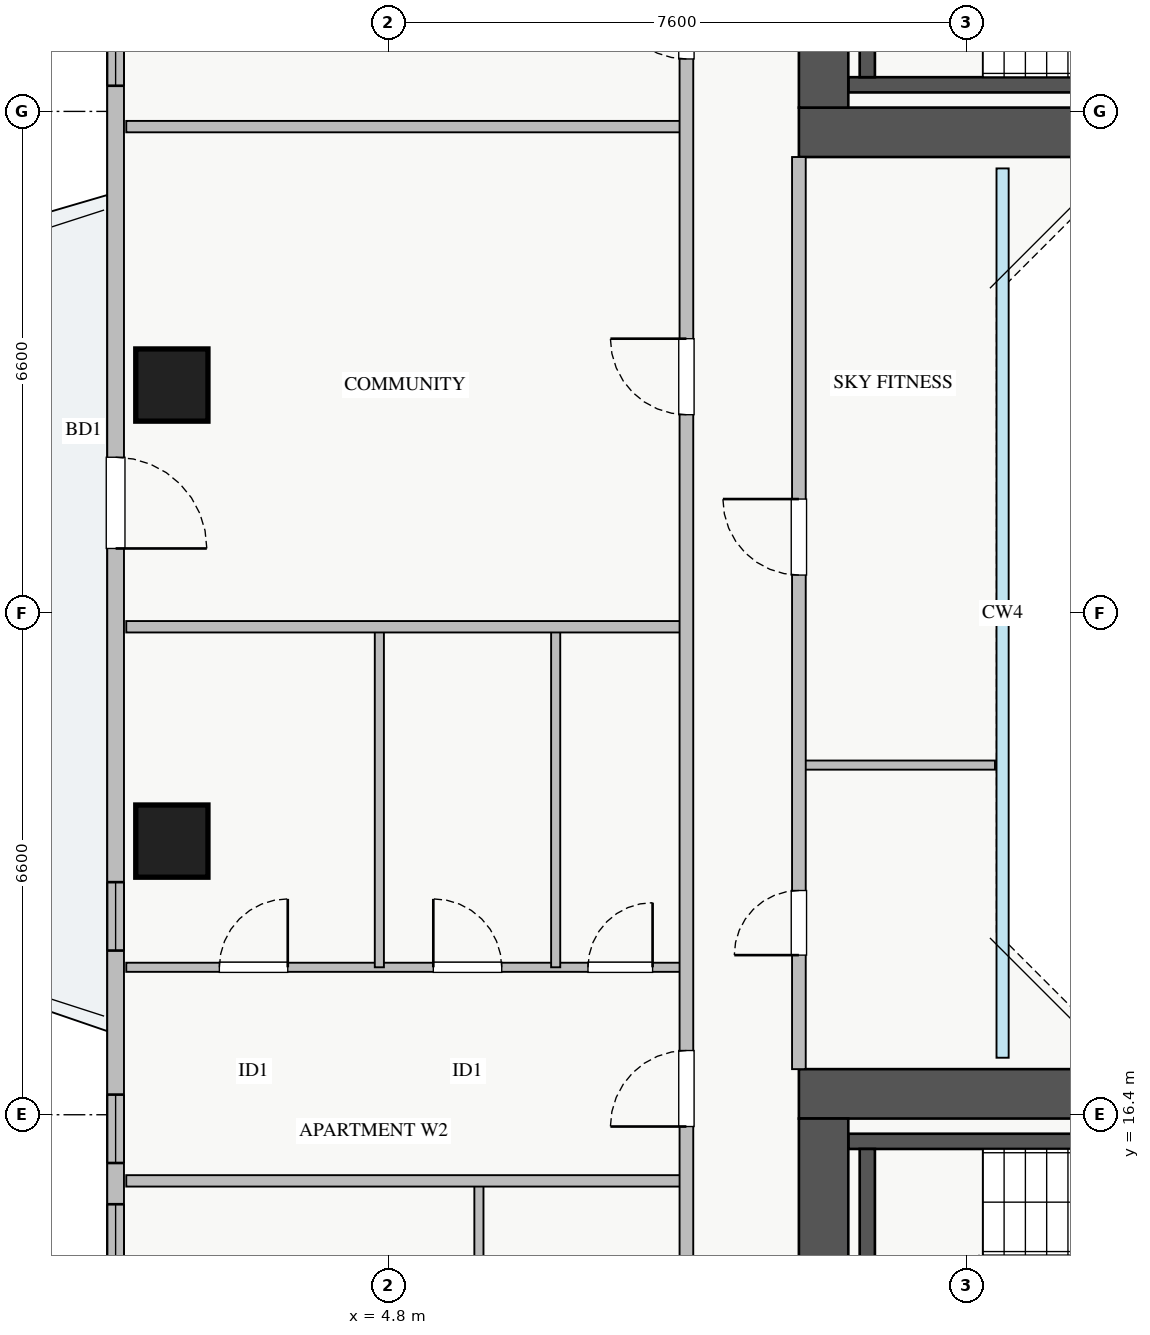
"""IFC4 building model, lengths in metres.
Left out: names, types, materials, properties, quantities, classifications, styles, units other than length and angle.
Written with IfcOpenShell. Run it as: python <this file> out.ifc"""

import sys

from ifc_helpers import new_model, si_unit, direction, frame, frame_2d, origin, origin_2d, place, context, subcontext, project, spatial, rectangle, extrude, source, transform, mapped, element, fill, save


model = new_model("IFC4")
c1 = context("Model", 3, precision=1e-05, world=origin(), true_north=direction((0.0, 1.0)))
c2 = subcontext(c1, "Body", "Model", "MODEL_VIEW")
j1 = project(units=[si_unit("LENGTHUNIT", "METRE"), si_unit("PLANEANGLEUNIT", "RADIAN")], contexts=[c1])
p1 = place(None, origin())
s1 = spatial("IfcSite", under=j1, at=p1, CompositionType="ELEMENT")
p2 = place(p1, origin())
s2 = spatial("IfcBuilding", under=s1, at=p2, CompositionType="ELEMENT")
p3 = place(p2, frame((0.0, 0.0, 179.5)))
s3 = spatial("IfcBuildingStorey", under=s2, at=p3, CompositionType="ELEMENT", Elevation=179.5)
p4 = place(p3, frame((10.85, 29.95, 0.0), z_axis=(0.0, 0.0, 1.0), x_axis=(1.0, 0.0, 0.0)))
e1 = element("IfcWall", 1, at=p4, inside=s3, PredefinedType="SHEAR", context=c2, shape_type="SweptSolid", body=[
    extrude(rectangle(XDim=7.3, YDim=0.2, at=frame_2d((3.65, 0.0))), origin(), (0.0, 0.0, 1.0), 3.25),
])
p5 = place(p3, frame((11.1, 30.05, 0.0), z_axis=(0.0, 0.0, 1.0), x_axis=(0.0, 1.0, 0.0)))
e2 = element("IfcWall", 2, at=p5, inside=s3, PredefinedType="SHEAR", context=c2, shape_type="SweptSolid", body=[
    extrude(rectangle(XDim=2.94, YDim=0.2, at=frame_2d((1.47, 0.0))), origin(), (0.0, 0.0, 1.0), 3.25),
])
p6 = place(p3, frame((10.85, 16.05, 0.0), z_axis=(0.0, 0.0, 1.0), x_axis=(1.0, 0.0, 0.0)))
e3 = element("IfcWall", 3, at=p6, inside=s3, PredefinedType="SHEAR", context=c2, shape_type="SweptSolid", body=[
    extrude(rectangle(XDim=7.3, YDim=0.2, at=frame_2d((3.65, 0.0))), origin(), (0.0, 0.0, 1.0), 3.25),
])
p7 = place(p3, frame((11.1, 13.01, 0.0), z_axis=(0.0, 0.0, 1.0), x_axis=(0.0, 1.0, 0.0)))
e4 = element("IfcWall", 4, at=p7, inside=s3, PredefinedType="SHEAR", context=c2, shape_type="SweptSolid", body=[
    extrude(rectangle(XDim=2.94, YDim=0.2, at=frame_2d((1.47, 0.0))), origin(), (0.0, 0.0, 1.0), 3.25),
])
p8 = place(p3, frame((10.2, 29.325, 0.0), z_axis=(0.0, 0.0, 1.0), x_axis=(1.0, 0.0, 0.0)))
e5 = element("IfcWall", 5, at=p8, inside=s3, PredefinedType="SHEAR", context=c2, shape_type="SweptSolid", body=[
    extrude(rectangle(XDim=17.6, YDim=0.65, at=frame_2d((8.8, 0.0))), origin(), (0.0, 0.0, 1.0), 3.25),
])
p9 = place(p3, frame((10.525, 29.65, 0.0), z_axis=(0.0, 0.0, 1.0), x_axis=(0.0, 1.0, 0.0)))
e6 = element("IfcWall", 6, at=p9, inside=s3, PredefinedType="SHEAR", context=c2, shape_type="SweptSolid", body=[
    extrude(rectangle(XDim=5.9, YDim=0.65, at=frame_2d((2.95, 0.0))), origin(), (0.0, 0.0, 1.0), 3.25),
])
p10 = place(p3, frame((10.2, 16.675, 0.0), z_axis=(0.0, 0.0, 1.0), x_axis=(1.0, 0.0, 0.0)))
e7 = element("IfcWall", 7, at=p10, inside=s3, PredefinedType="SHEAR", context=c2, shape_type="SweptSolid", body=[
    extrude(rectangle(XDim=17.6, YDim=0.65, at=frame_2d((8.8, 0.0))), origin(), (0.0, 0.0, 1.0), 3.25),
])
p11 = place(p3, frame((10.525, 10.45, 0.0), z_axis=(0.0, 0.0, 1.0), x_axis=(0.0, 1.0, 0.0)))
e8 = element("IfcWall", 8, at=p11, inside=s3, PredefinedType="SHEAR", context=c2, shape_type="SweptSolid", body=[
    extrude(rectangle(XDim=5.9, YDim=0.65, at=frame_2d((2.95, 0.0))), origin(), (0.0, 0.0, 1.0), 3.25),
])
m1 = source(origin(), c2, "Body", "SweptSolid", [
    extrude(rectangle(XDim=0.95, YDim=0.95, at=origin_2d()), origin(), (0.0, 0.0, 1.0), 3.25),
])
for number, where, z_axis, x_axis in (
    (9, (1.95, 26.0, 0.0), (0.0, 0.0, 1.0), (1.0, 0.0, 0.0)),
    (10, (1.95, 20.0, 0.0), (0.0, 0.0, 1.0), (1.0, 0.0, 0.0)),
):
    element("IfcColumn", number, at=place(p3, frame(where, z_axis=z_axis, x_axis=x_axis)), inside=s3, PredefinedType="COLUMN", context=c2, shape_type="MappedRepresentation", body=[
        mapped(m1, transform((0.0, 0.0, 0.0), x_axis=(1.0, 0.0, 0.0), y_axis=(0.0, 1.0, 0.0), z_axis=(0.0, 0.0, 1.0), scale=1.0)),
    ])
p12 = place(p3, frame((1.21, 10.55, 0.0), z_axis=(0.0, 0.0, 1.0), x_axis=(0.0, 1.0, 0.0)))
e11 = element("IfcWall", 11, at=p12, inside=s3, PredefinedType="STANDARD", context=c2, shape_type="SweptSolid", body=[
    extrude(rectangle(XDim=24.9, YDim=0.22, at=frame_2d((12.45, 0.0))), origin(), (0.0, 0.0, 1.0), 2.61),
])
p13 = place(p12, frame((13.3, 0.0, 0.0)))
e12 = element("IfcOpeningElement", 12, at=p13, cuts=e11, PredefinedType="OPENING", context=c2, shape_type="SweptSolid", body=[
    extrude(rectangle(XDim=1.2, YDim=2.1, at=frame_2d((0.6, 1.05))), frame((0.0, 0.12, 0.0), z_axis=(0.0, -1.0, 0.0), x_axis=(1.0, 0.0, 0.0)), (0.0, 0.0, 1.0), 0.24),
])
p14 = place(p12, frame((2.573, 0.0, 0.9)))
e13 = element("IfcOpeningElement", 13, at=p14, cuts=e11, PredefinedType="OPENING", context=c2, shape_type="SweptSolid", body=[
    extrude(rectangle(XDim=2.1, YDim=1.5, at=frame_2d((1.05, 0.75))), frame((0.0, 0.12, 0.0), z_axis=(0.0, -1.0, 0.0), x_axis=(1.0, 0.0, 0.0)), (0.0, 0.0, 1.0), 0.24),
])
p15 = place(p12, frame((19.387, 0.0, 0.9)))
e14 = element("IfcOpeningElement", 14, at=p15, cuts=e11, PredefinedType="OPENING", context=c2, shape_type="SweptSolid", body=[
    extrude(rectangle(XDim=2.1, YDim=1.5, at=frame_2d((1.05, 0.75))), frame((0.0, 0.12, 0.0), z_axis=(0.0, -1.0, 0.0), x_axis=(1.0, 0.0, 0.0)), (0.0, 0.0, 1.0), 0.24),
])
p16 = place(p12, frame((22.24, 0.0, 0.9)))
e15 = element("IfcOpeningElement", 15, at=p16, cuts=e11, PredefinedType="OPENING", context=c2, shape_type="SweptSolid", body=[
    extrude(rectangle(XDim=2.4, YDim=1.5, at=frame_2d((1.2, 0.75))), frame((0.0, 0.12, 0.0), z_axis=(0.0, -1.0, 0.0), x_axis=(1.0, 0.0, 0.0)), (0.0, 0.0, 1.0), 0.24),
])
p17 = place(p12, frame((0.25, 0.0, 0.9)))
e16 = element("IfcOpeningElement", 16, at=p17, cuts=e11, PredefinedType="OPENING", context=c2, shape_type="SweptSolid", body=[
    extrude(rectangle(XDim=0.9, YDim=1.2, at=frame_2d((0.45, 0.6))), frame((0.0, 0.12, 0.0), z_axis=(0.0, -1.0, 0.0), x_axis=(1.0, 0.0, 0.0)), (0.0, 0.0, 1.0), 0.24),
])
p18 = place(p12, frame((8.01, 0.0, 0.9)))
e17 = element("IfcOpeningElement", 17, at=p18, cuts=e11, PredefinedType="OPENING", context=c2, shape_type="SweptSolid", body=[
    extrude(rectangle(XDim=0.9, YDim=1.2, at=frame_2d((0.45, 0.6))), frame((0.0, 0.12, 0.0), z_axis=(0.0, -1.0, 0.0), x_axis=(1.0, 0.0, 0.0)), (0.0, 0.0, 1.0), 0.24),
])
p19 = place(p12, frame((5.215, 0.0, 0.9)))
e18 = element("IfcOpeningElement", 18, at=p19, cuts=e11, PredefinedType="OPENING", context=c2, shape_type="SweptSolid", body=[
    extrude(rectangle(XDim=0.9, YDim=1.2, at=frame_2d((0.45, 0.6))), frame((0.0, 0.12, 0.0), z_axis=(0.0, -1.0, 0.0), x_axis=(1.0, 0.0, 0.0)), (0.0, 0.0, 1.0), 0.24),
])
p20 = place(p3, frame((5.99, 12.83, 0.0), z_axis=(0.0, 0.0, 1.0), x_axis=(0.0, 1.0, 0.0)))
e19 = element("IfcWall", 19, at=p20, inside=s3, PredefinedType="PLUMBINGWALL", context=c2, shape_type="SweptSolid", body=[
    extrude(rectangle(XDim=2.7, YDim=0.12, at=frame_2d((1.35, 0.0))), origin(), (0.0, 0.0, 1.0), 2.821),
])
p21 = place(p3, frame((1.35, 18.34, 0.0), z_axis=(0.0, 0.0, 1.0), x_axis=(1.0, 0.0, 0.0)))
e20 = element("IfcWall", 20, at=p21, inside=s3, PredefinedType="PLUMBINGWALL", context=c2, shape_type="SweptSolid", body=[
    extrude(rectangle(XDim=7.37, YDim=0.12, at=frame_2d((3.685, 0.0))), origin(), (0.0, 0.0, 1.0), 2.765),
])
p22 = place(p21, frame((1.225, 0.0, 0.0)))
e21 = element("IfcOpeningElement", 21, at=p22, cuts=e20, PredefinedType="OPENING", context=c2, shape_type="SweptSolid", body=[
    extrude(rectangle(XDim=0.9, YDim=2.05, at=frame_2d((0.45, 1.025))), frame((0.0, 0.07, 0.0), z_axis=(0.0, -1.0, 0.0), x_axis=(1.0, 0.0, 0.0)), (0.0, 0.0, 1.0), 0.14),
])
p23 = place(p21, frame((4.04, 0.0, 0.0)))
e22 = element("IfcOpeningElement", 22, at=p23, cuts=e20, PredefinedType="OPENING", context=c2, shape_type="SweptSolid", body=[
    extrude(rectangle(XDim=0.9, YDim=2.05, at=frame_2d((0.45, 1.025))), frame((0.0, 0.07, 0.0), z_axis=(0.0, -1.0, 0.0), x_axis=(1.0, 0.0, 0.0)), (0.0, 0.0, 1.0), 0.14),
])
p24 = place(p21, frame((6.075, 0.0, 0.0)))
e23 = element("IfcOpeningElement", 23, at=p24, cuts=e20, PredefinedType="OPENING", context=c2, shape_type="SweptSolid", body=[
    extrude(rectangle(XDim=0.85, YDim=2.05, at=frame_2d((0.425, 1.025))), frame((0.0, 0.07, 0.0), z_axis=(0.0, -1.0, 0.0), x_axis=(1.0, 0.0, 0.0)), (0.0, 0.0, 1.0), 0.14),
])
for number, where, z_axis, x_axis in (
    (24, (4.68, 18.34, 0.0), (0.0, 0.0, 1.0), (0.0, 1.0, 0.0)),
    (25, (7.0, 18.34, 0.0), (0.0, 0.0, 1.0), (0.0, 1.0, 0.0)),
):
    element("IfcWall", number, at=place(p3, frame(where, z_axis=z_axis, x_axis=x_axis)), inside=s3, PredefinedType="PLUMBINGWALL", context=c2, shape_type="SweptSolid", body=[
        extrude(rectangle(XDim=4.48, YDim=0.12, at=frame_2d((2.24, 0.0))), origin(), (0.0, 0.0, 1.0), 3.07),
    ])
for number, where, z_axis, x_axis in (
    (26, (1.35, 15.53, 0.0), (0.0, 0.0, 1.0), (1.0, 0.0, 0.0)),
    (27, (1.35, 22.82, 0.0), (0.0, 0.0, 1.0), (1.0, 0.0, 0.0)),
    (28, (1.35, 29.4, 0.0), (0.0, 0.0, 1.0), (1.0, 0.0, 0.0)),
):
    element("IfcWall", number, at=place(p3, frame(where, z_axis=z_axis, x_axis=x_axis)), inside=s3, PredefinedType="PARTITIONING", context=c2, shape_type="SweptSolid", body=[
        extrude(rectangle(XDim=7.37, YDim=0.15, at=frame_2d((3.685, 0.0))), origin(), (0.0, 0.0, 1.0), 3.07),
    ])
p25 = place(p3, frame((8.72, 8.31, 0.0), z_axis=(0.0, 0.0, 1.0), x_axis=(0.0, 1.0, 0.0)))
e29 = element("IfcWall", 29, at=p25, inside=s3, PredefinedType="PARTITIONING", context=c2, shape_type="SweptSolid", body=[
    extrude(rectangle(XDim=29.37, YDim=0.18, at=frame_2d((14.685, 0.0))), origin(), (0.0, 0.0, 1.0), 3.07),
])
p26 = place(p25, frame((28.06, 0.0, 0.0)))
e30 = element("IfcOpeningElement", 30, at=p26, cuts=e29, PredefinedType="OPENING", context=c2, shape_type="SweptSolid", body=[
    extrude(rectangle(XDim=0.9, YDim=2.05, at=frame_2d((0.45, 1.025))), frame((0.0, 0.1, 0.0), z_axis=(0.0, -1.0, 0.0), x_axis=(1.0, 0.0, 0.0)), (0.0, 0.0, 1.0), 0.2),
])
p27 = place(p25, frame((0.24, 0.0, 0.0)))
e31 = element("IfcOpeningElement", 31, at=p27, cuts=e29, PredefinedType="OPENING", context=c2, shape_type="SweptSolid", body=[
    extrude(rectangle(XDim=0.9, YDim=2.05, at=frame_2d((0.45, 1.025))), frame((0.0, 0.1, 0.0), z_axis=(0.0, -1.0, 0.0), x_axis=(1.0, 0.0, 0.0)), (0.0, 0.0, 1.0), 0.2),
])
p28 = place(p25, frame((2.25, 0.0, 0.0)))
e32 = element("IfcOpeningElement", 32, at=p28, cuts=e29, PredefinedType="OPENING", context=c2, shape_type="SweptSolid", body=[
    extrude(rectangle(XDim=1.0, YDim=2.05, at=frame_2d((0.5, 1.025))), frame((0.0, 0.1, 0.0), z_axis=(0.0, -1.0, 0.0), x_axis=(1.0, 0.0, 0.0)), (0.0, 0.0, 1.0), 0.2),
])
p29 = place(p25, frame((7.935, 0.0, 0.0)))
e33 = element("IfcOpeningElement", 33, at=p29, cuts=e29, PredefinedType="OPENING", context=c2, shape_type="SweptSolid", body=[
    extrude(rectangle(XDim=1.0, YDim=2.05, at=frame_2d((0.5, 1.025))), frame((0.0, 0.1, 0.0), z_axis=(0.0, -1.0, 0.0), x_axis=(1.0, 0.0, 0.0)), (0.0, 0.0, 1.0), 0.2),
])
p30 = place(p25, frame((17.3, 0.0, 0.0)))
e34 = element("IfcOpeningElement", 34, at=p30, cuts=e29, PredefinedType="OPENING", context=c2, shape_type="SweptSolid", body=[
    extrude(rectangle(XDim=1.0, YDim=2.05, at=frame_2d((0.5, 1.025))), frame((0.0, 0.1, 0.0), z_axis=(0.0, -1.0, 0.0), x_axis=(1.0, 0.0, 0.0)), (0.0, 0.0, 1.0), 0.2),
])
p31 = place(p25, frame((21.98, 0.0, 0.0)))
e35 = element("IfcOpeningElement", 35, at=p31, cuts=e29, PredefinedType="OPENING", context=c2, shape_type="SweptSolid", body=[
    extrude(rectangle(XDim=1.0, YDim=2.05, at=frame_2d((0.5, 1.025))), frame((0.0, 0.1, 0.0), z_axis=(0.0, -1.0, 0.0), x_axis=(1.0, 0.0, 0.0)), (0.0, 0.0, 1.0), 0.2),
])
p32 = place(p3, frame((10.2, 21.0, 0.0), z_axis=(0.0, 0.0, 1.0), x_axis=(1.0, 0.0, 0.0)))
e36 = element("IfcWall", 36, at=p32, inside=s3, PredefinedType="PLUMBINGWALL", context=c2, shape_type="SweptSolid", body=[
    extrude(rectangle(XDim=2.58, YDim=0.12, at=frame_2d((1.29, 0.0))), origin(), (0.0, 0.0, 1.0), 3.07),
])
p33 = place(p3, frame((10.2, 17.0, 0.0), z_axis=(0.0, 0.0, 1.0), x_axis=(0.0, 1.0, 0.0)))
e37 = element("IfcWall", 37, at=p33, inside=s3, PredefinedType="PARTITIONING", context=c2, shape_type="SweptSolid", body=[
    extrude(rectangle(XDim=12.0, YDim=0.18, at=frame_2d((6.0, 0.0))), origin(), (0.0, 0.0, 1.0), 3.07),
])
p34 = place(p33, frame((1.5, 0.0, 0.0)))
e38 = element("IfcOpeningElement", 38, at=p34, cuts=e37, PredefinedType="OPENING", context=c2, shape_type="SweptSolid", body=[
    extrude(rectangle(XDim=0.85, YDim=2.05, at=frame_2d((0.425, 1.025))), frame((0.0, 0.1, 0.0), z_axis=(0.0, -1.0, 0.0), x_axis=(1.0, 0.0, 0.0)), (0.0, 0.0, 1.0), 0.2),
])
p35 = place(p33, frame((6.5, 0.0, 0.0)))
e39 = element("IfcOpeningElement", 39, at=p35, cuts=e37, PredefinedType="OPENING", context=c2, shape_type="SweptSolid", body=[
    extrude(rectangle(XDim=1.0, YDim=2.05, at=frame_2d((0.5, 1.025))), frame((0.0, 0.1, 0.0), z_axis=(0.0, -1.0, 0.0), x_axis=(1.0, 0.0, 0.0)), (0.0, 0.0, 1.0), 0.2),
])
m2 = source(origin(), c2, "Body", "SweptSolid", [
    extrude(rectangle(XDim=1.2, YDim=2.1, at=frame_2d((0.6, 1.05))), frame((0.0, 0.025, 0.0), z_axis=(0.0, -1.0, 0.0), x_axis=(1.0, 0.0, 0.0)), (0.0, 0.0, 1.0), 0.05),
])
p36 = place(p13, frame((1.2, 0.0, 0.0), z_axis=(0.0, 0.0, 1.0), x_axis=(-1.0, 0.0, 0.0)))
e40 = element("IfcDoor", 40, at=p36, inside=s3, OperationType="SINGLE_SWING_LEFT", PredefinedType="DOOR", context=c2, shape_type="MappedRepresentation", body=[
    mapped(m2, transform((0.0, 0.0, 0.0), x_axis=(1.0, 0.0, 0.0), y_axis=(0.0, 1.0, 0.0), z_axis=(0.0, 0.0, 1.0), scale=1.0)),
])
fill(e12, e40)
m3 = source(origin(), c2, "Body", "SweptSolid", [
    extrude(rectangle(XDim=2.1, YDim=1.5, at=frame_2d((1.05, 0.75))), frame((0.0, 0.03, 0.0), z_axis=(0.0, -1.0, 0.0), x_axis=(1.0, 0.0, 0.0)), (0.0, 0.0, 1.0), 0.06),
])
p37 = place(p14, origin())
e41 = element("IfcWindow", 41, at=p37, inside=s3, PartitioningType="TRIPLE_PANEL_VERTICAL", PredefinedType="WINDOW", context=c2, shape_type="MappedRepresentation", body=[
    mapped(m3, transform((0.0, 0.0, 0.0), x_axis=(1.0, 0.0, 0.0), y_axis=(0.0, 1.0, 0.0), z_axis=(0.0, 0.0, 1.0), scale=1.0)),
])
fill(e13, e41)
p38 = place(p15, origin())
e42 = element("IfcWindow", 42, at=p38, inside=s3, PartitioningType="TRIPLE_PANEL_VERTICAL", PredefinedType="WINDOW", context=c2, shape_type="MappedRepresentation", body=[
    mapped(m3, transform((0.0, 0.0, 0.0), x_axis=(1.0, 0.0, 0.0), y_axis=(0.0, 1.0, 0.0), z_axis=(0.0, 0.0, 1.0), scale=1.0)),
])
fill(e14, e42)
m4 = source(origin(), c2, "Body", "SweptSolid", [
    extrude(rectangle(XDim=0.9, YDim=2.05, at=frame_2d((0.45, 1.025))), frame((0.0, 0.025, 0.0), z_axis=(0.0, -1.0, 0.0), x_axis=(1.0, 0.0, 0.0)), (0.0, 0.0, 1.0), 0.05),
])
p39 = place(p22, origin())
e43 = element("IfcDoor", 43, at=p39, inside=s3, OperationType="SINGLE_SWING_RIGHT", PredefinedType="DOOR", context=c2, shape_type="MappedRepresentation", body=[
    mapped(m4, transform((0.0, 0.0, 0.0), x_axis=(1.0, 0.0, 0.0), y_axis=(0.0, 1.0, 0.0), z_axis=(0.0, 0.0, 1.0), scale=1.0)),
])
fill(e21, e43)
p40 = place(p23, origin())
e44 = element("IfcDoor", 44, at=p40, inside=s3, OperationType="SINGLE_SWING_LEFT", PredefinedType="DOOR", context=c2, shape_type="MappedRepresentation", body=[
    mapped(m4, transform((0.0, 0.0, 0.0), x_axis=(1.0, 0.0, 0.0), y_axis=(0.0, 1.0, 0.0), z_axis=(0.0, 0.0, 1.0), scale=1.0)),
])
fill(e22, e44)
m5 = source(origin(), c2, "Body", "SweptSolid", [
    extrude(rectangle(XDim=0.85, YDim=2.05, at=frame_2d((0.425, 1.025))), frame((0.0, 0.025, 0.0), z_axis=(0.0, -1.0, 0.0), x_axis=(1.0, 0.0, 0.0)), (0.0, 0.0, 1.0), 0.05),
])
p41 = place(p24, origin())
e45 = element("IfcDoor", 45, at=p41, inside=s3, OperationType="SINGLE_SWING_RIGHT", PredefinedType="DOOR", context=c2, shape_type="MappedRepresentation", body=[
    mapped(m5, transform((0.0, 0.0, 0.0), x_axis=(1.0, 0.0, 0.0), y_axis=(0.0, 1.0, 0.0), z_axis=(0.0, 0.0, 1.0), scale=1.0)),
])
fill(e23, e45)
m6 = source(origin(), c2, "Body", "SweptSolid", [
    extrude(rectangle(XDim=1.0, YDim=2.05, at=frame_2d((0.5, 1.025))), frame((0.0, 0.025, 0.0), z_axis=(0.0, -1.0, 0.0), x_axis=(1.0, 0.0, 0.0)), (0.0, 0.0, 1.0), 0.05),
])
p42 = place(p29, origin())
e46 = element("IfcDoor", 46, at=p42, inside=s3, OperationType="SINGLE_SWING_LEFT", PredefinedType="DOOR", context=c2, shape_type="MappedRepresentation", body=[
    mapped(m6, transform((0.0, 0.0, 0.0), x_axis=(1.0, 0.0, 0.0), y_axis=(0.0, 1.0, 0.0), z_axis=(0.0, 0.0, 1.0), scale=1.0)),
])
fill(e33, e46)
p43 = place(p30, origin())
e47 = element("IfcDoor", 47, at=p43, inside=s3, OperationType="SINGLE_SWING_RIGHT", PredefinedType="DOOR", context=c2, shape_type="MappedRepresentation", body=[
    mapped(m6, transform((0.0, 0.0, 0.0), x_axis=(1.0, 0.0, 0.0), y_axis=(0.0, 1.0, 0.0), z_axis=(0.0, 0.0, 1.0), scale=1.0)),
])
fill(e34, e47)
p44 = place(p31, origin())
e48 = element("IfcDoor", 48, at=p44, inside=s3, OperationType="SINGLE_SWING_RIGHT", PredefinedType="DOOR", context=c2, shape_type="MappedRepresentation", body=[
    mapped(m6, transform((0.0, 0.0, 0.0), x_axis=(1.0, 0.0, 0.0), y_axis=(0.0, 1.0, 0.0), z_axis=(0.0, 0.0, 1.0), scale=1.0)),
])
fill(e35, e48)
p45 = place(p34, origin())
e49 = element("IfcDoor", 49, at=p45, inside=s3, OperationType="SINGLE_SWING_LEFT", PredefinedType="DOOR", context=c2, shape_type="MappedRepresentation", body=[
    mapped(m5, transform((0.0, 0.0, 0.0), x_axis=(1.0, 0.0, 0.0), y_axis=(0.0, 1.0, 0.0), z_axis=(0.0, 0.0, 1.0), scale=1.0)),
])
fill(e38, e49)
p46 = place(p35, origin())
e50 = element("IfcDoor", 50, at=p46, inside=s3, OperationType="SINGLE_SWING_RIGHT", PredefinedType="DOOR", context=c2, shape_type="MappedRepresentation", body=[
    mapped(m6, transform((0.0, 0.0, 0.0), x_axis=(1.0, 0.0, 0.0), y_axis=(0.0, 1.0, 0.0), z_axis=(0.0, 0.0, 1.0), scale=1.0)),
])
fill(e39, e50)
m7 = source(origin(), c2, "Body", "SweptSolid", [
    extrude(rectangle(XDim=0.9, YDim=1.2, at=frame_2d((0.45, 0.6))), frame((0.0, 0.03, 0.0), z_axis=(0.0, -1.0, 0.0), x_axis=(1.0, 0.0, 0.0)), (0.0, 0.0, 1.0), 0.06),
])
p47 = place(p18, origin())
e51 = element("IfcWindow", 51, at=p47, inside=s3, PartitioningType="SINGLE_PANEL", PredefinedType="WINDOW", context=c2, shape_type="MappedRepresentation", body=[
    mapped(m7, transform((0.0, 0.0, 0.0), x_axis=(1.0, 0.0, 0.0), y_axis=(0.0, 1.0, 0.0), z_axis=(0.0, 0.0, 1.0), scale=1.0)),
])
fill(e17, e51)
p48 = place(p19, origin())
e52 = element("IfcWindow", 52, at=p48, inside=s3, PartitioningType="SINGLE_PANEL", PredefinedType="WINDOW", context=c2, shape_type="MappedRepresentation", body=[
    mapped(m7, transform((0.0, 0.0, 0.0), x_axis=(1.0, 0.0, 0.0), y_axis=(0.0, 1.0, 0.0), z_axis=(0.0, 0.0, 1.0), scale=1.0)),
])
fill(e18, e52)
save(model, sys.argv[1])
